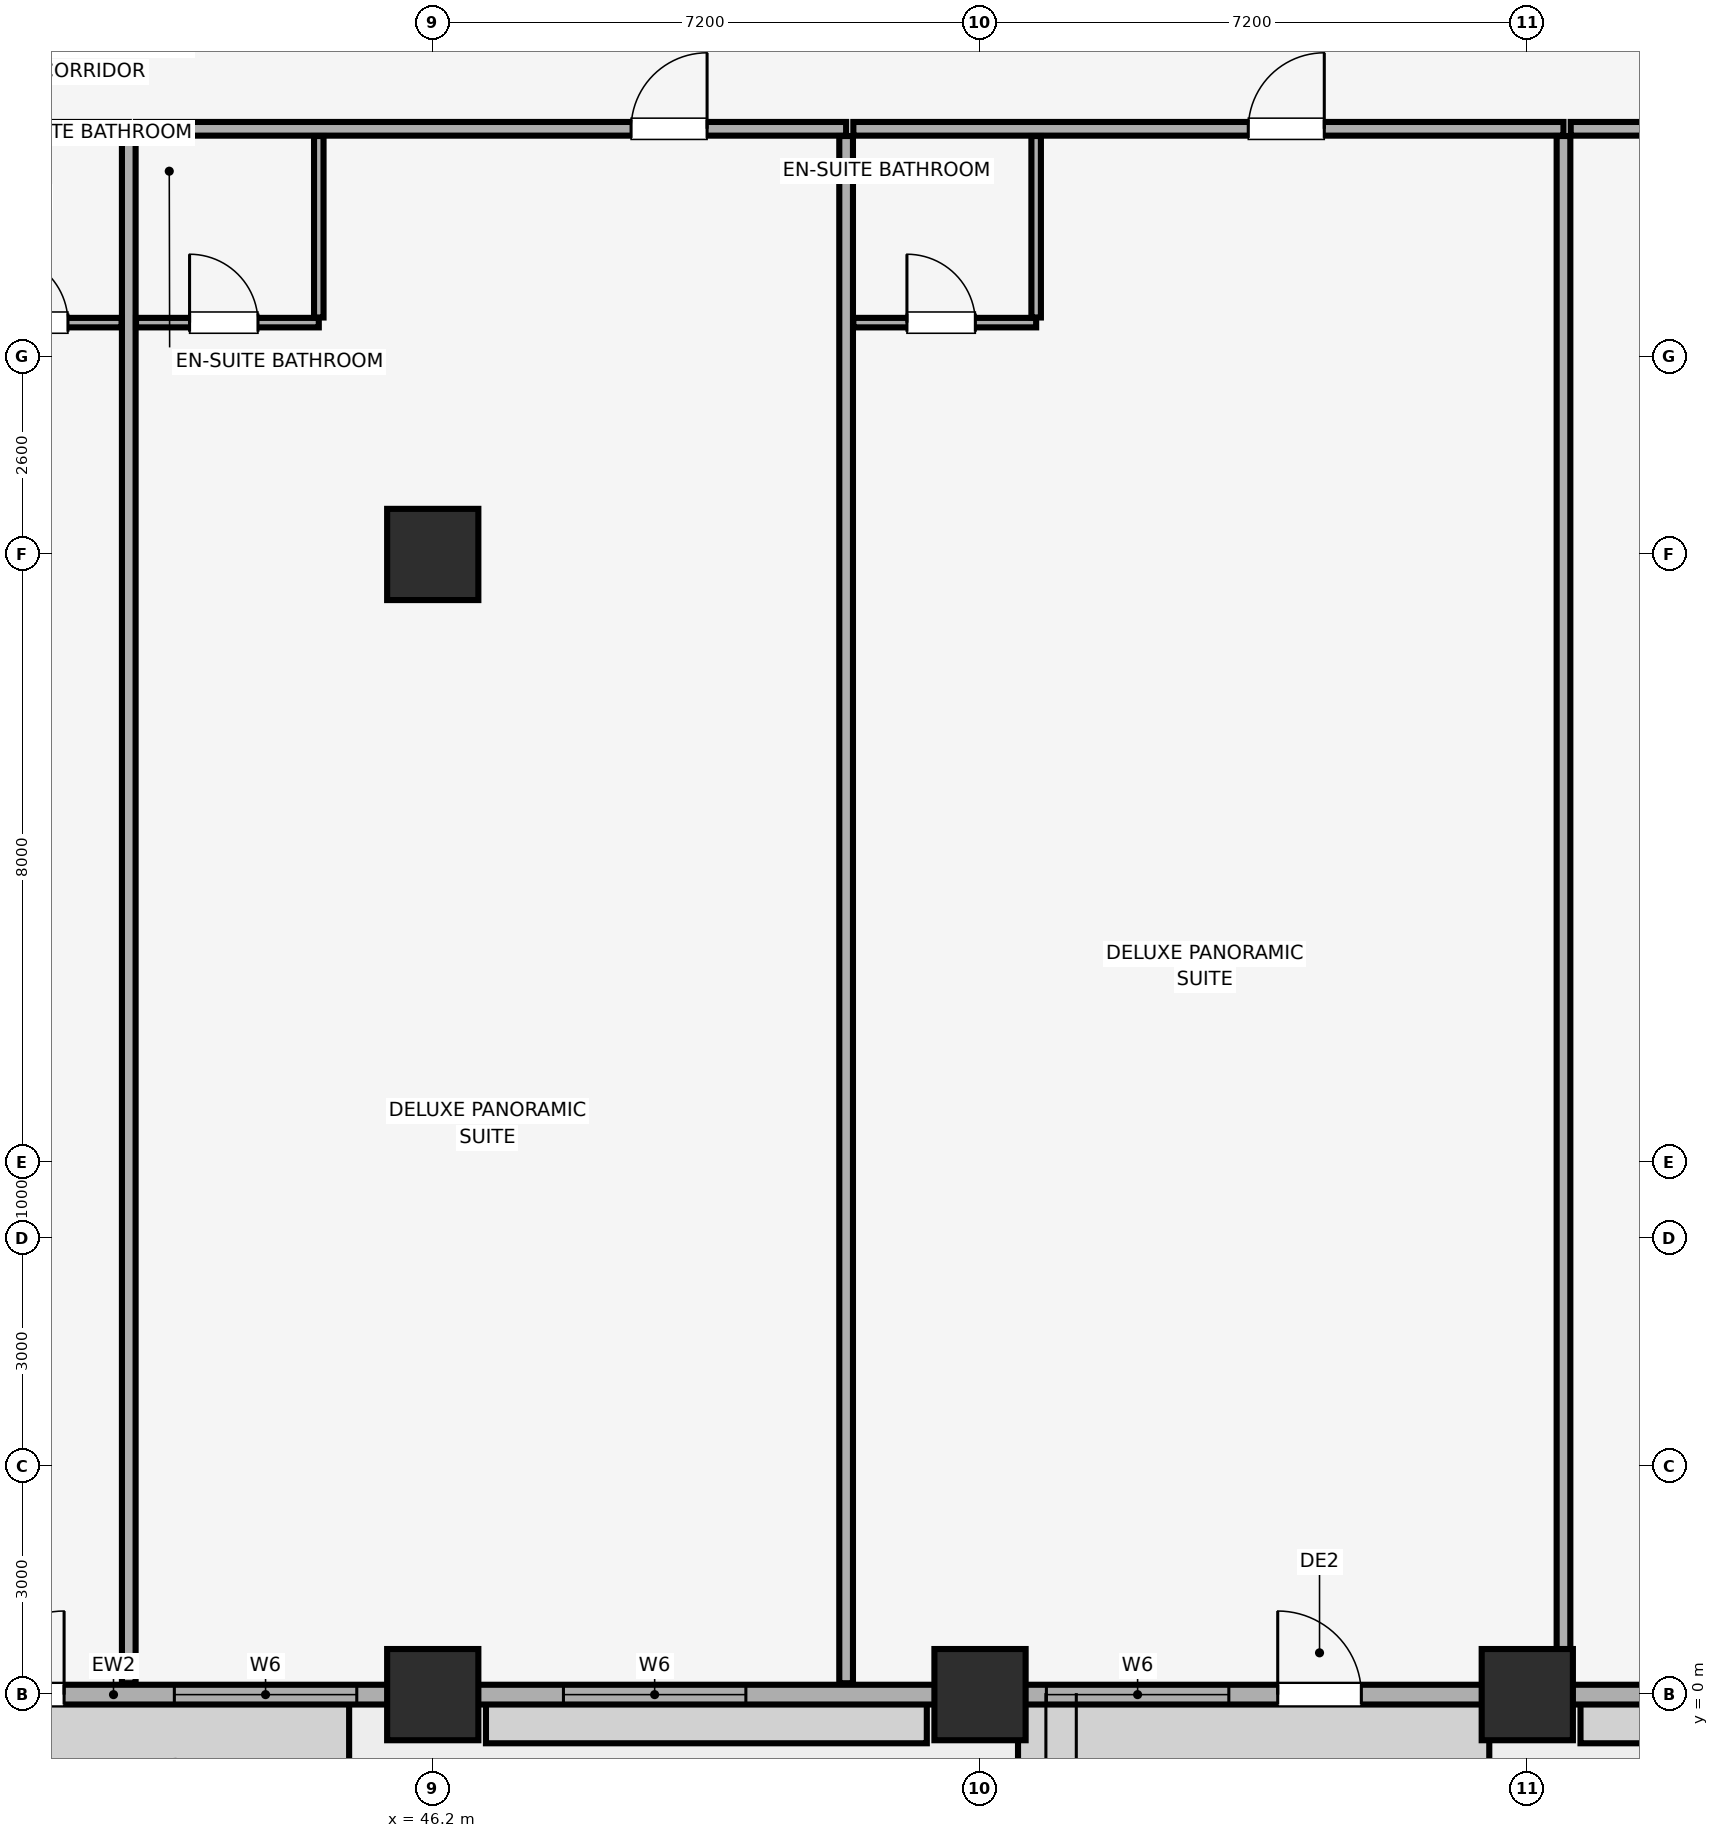
"""IFC4 building model, lengths in metres.
Left out: names, types, materials, properties, quantities, classifications, styles, units other than length and angle.
Written with IfcOpenShell. Run it as: python <this file> out.ifc"""

import sys

from ifc_helpers import new_model, si_unit, direction, frame, frame_2d, origin, origin_2d, place, context, subcontext, project, spatial, rectangle, extrude, element, fill, save


model = new_model("IFC4")
c1 = context("Model", 3, precision=1e-05, world=origin(), true_north=direction((0.0, 1.0)))
c2 = subcontext(c1, "Body", "Model", "MODEL_VIEW")
j1 = project(units=[si_unit("LENGTHUNIT", "METRE"), si_unit("PLANEANGLEUNIT", "RADIAN")], contexts=[c1])
p1 = place(None, origin())
s1 = spatial("IfcSite", under=j1, at=p1, CompositionType="ELEMENT")
p2 = place(p1, origin())
s2 = spatial("IfcBuilding", under=s1, at=p2, CompositionType="ELEMENT")
p3 = place(p2, frame((0.0, 0.0, 93.05)))
s3 = spatial("IfcBuildingStorey", under=s2, at=p3, CompositionType="ELEMENT", Elevation=93.05)
for number, where, z_axis, x_axis in (
    (1, (46.2, 0.0, 0.0), (0.0, 0.0, 1.0), (1.0, 0.0, 0.0)),
    (2, (53.4, 0.0, 0.0), (0.0, 0.0, 1.0), (1.0, 0.0, 0.0)),
    (3, (60.6, 0.0, 0.0), (0.0, 0.0, 1.0), (1.0, 0.0, 0.0)),
    (4, (46.2, 15.0, 0.0), (0.0, 0.0, 1.0), (1.0, 0.0, 0.0)),
):
    element("IfcColumn", number, at=place(p3, frame(where, z_axis=z_axis, x_axis=x_axis)), inside=s3, PredefinedType="COLUMN", context=c2, shape_type="SweptSolid", body=[
        extrude(rectangle(XDim=1.2, YDim=1.2, at=origin_2d()), origin(), (0.0, 0.0, 1.0), 3.51),
    ])
p4 = place(p3, frame((4.2, 0.0, 0.0), z_axis=(0.0, 0.0, 1.0), x_axis=(1.0, 0.0, 0.0)))
e5 = element("IfcWall", 5, at=p4, inside=s3, PredefinedType="SOLIDWALL", context=c2, shape_type="SweptSolid", body=[
    extrude(rectangle(XDim=75.6, YDim=0.26, at=frame_2d((37.8, 0.0))), origin(), (0.0, 0.0, 1.0), 2.56),
])
p5 = place(p4, frame((21.383, 0.0, 0.0)))
e6 = element("IfcOpeningElement", 6, at=p5, cuts=e5, PredefinedType="OPENING", context=c2, shape_type="SweptSolid", body=[
    extrude(rectangle(XDim=1.1, YDim=2.15, at=frame_2d((0.55, 1.075))), frame((0.0, 0.14, 0.0), z_axis=(0.0, -1.0, 0.0), x_axis=(1.0, 0.0, 0.0)), (0.0, 0.0, 1.0), 0.28),
])
p6 = place(p4, frame((36.05, 0.0, 0.0)))
e7 = element("IfcOpeningElement", 7, at=p6, cuts=e5, PredefinedType="OPENING", context=c2, shape_type="SweptSolid", body=[
    extrude(rectangle(XDim=1.1, YDim=2.15, at=frame_2d((0.55, 1.075))), frame((0.0, 0.14, 0.0), z_axis=(0.0, -1.0, 0.0), x_axis=(1.0, 0.0, 0.0)), (0.0, 0.0, 1.0), 0.28),
])
p7 = place(p4, frame((53.117, 0.0, 0.0)))
e8 = element("IfcOpeningElement", 8, at=p7, cuts=e5, PredefinedType="OPENING", context=c2, shape_type="SweptSolid", body=[
    extrude(rectangle(XDim=1.1, YDim=2.15, at=frame_2d((0.55, 1.075))), frame((0.0, 0.14, 0.0), z_axis=(0.0, -1.0, 0.0), x_axis=(1.0, 0.0, 0.0)), (0.0, 0.0, 1.0), 0.28),
])
p8 = place(p4, frame((1.035, 0.0, 0.85)))
e9 = element("IfcOpeningElement", 9, at=p8, cuts=e5, PredefinedType="OPENING", context=c2, shape_type="SweptSolid", body=[
    extrude(rectangle(XDim=2.4, YDim=1.5, at=frame_2d((1.2, 0.75))), frame((0.0, 0.14, 0.0), z_axis=(0.0, -1.0, 0.0), x_axis=(1.0, 0.0, 0.0)), (0.0, 0.0, 1.0), 0.28),
])
p9 = place(p4, frame((6.244, 0.0, 0.85)))
e10 = element("IfcOpeningElement", 10, at=p9, cuts=e5, PredefinedType="OPENING", context=c2, shape_type="SweptSolid", body=[
    extrude(rectangle(XDim=2.4, YDim=1.5, at=frame_2d((1.2, 0.75))), frame((0.0, 0.14, 0.0), z_axis=(0.0, -1.0, 0.0), x_axis=(1.0, 0.0, 0.0)), (0.0, 0.0, 1.0), 0.28),
])
p10 = place(p4, frame((14.4, 0.0, 0.85)))
e11 = element("IfcOpeningElement", 11, at=p10, cuts=e5, PredefinedType="OPENING", context=c2, shape_type="SweptSolid", body=[
    extrude(rectangle(XDim=2.4, YDim=1.5, at=frame_2d((1.2, 0.75))), frame((0.0, 0.14, 0.0), z_axis=(0.0, -1.0, 0.0), x_axis=(1.0, 0.0, 0.0)), (0.0, 0.0, 1.0), 0.28),
])
p11 = place(p4, frame((23.127, 0.0, 0.85)))
e12 = element("IfcOpeningElement", 12, at=p11, cuts=e5, PredefinedType="OPENING", context=c2, shape_type="SweptSolid", body=[
    extrude(rectangle(XDim=2.4, YDim=1.5, at=frame_2d((1.2, 0.75))), frame((0.0, 0.14, 0.0), z_axis=(0.0, -1.0, 0.0), x_axis=(1.0, 0.0, 0.0)), (0.0, 0.0, 1.0), 0.28),
])
p12 = place(p4, frame((29.681, 0.0, 0.85)))
e13 = element("IfcOpeningElement", 13, at=p12, cuts=e5, PredefinedType="OPENING", context=c2, shape_type="SweptSolid", body=[
    extrude(rectangle(XDim=2.4, YDim=1.5, at=frame_2d((1.2, 0.75))), frame((0.0, 0.14, 0.0), z_axis=(0.0, -1.0, 0.0), x_axis=(1.0, 0.0, 0.0)), (0.0, 0.0, 1.0), 0.28),
])
p13 = place(p4, frame((38.601, 0.0, 0.85)))
e14 = element("IfcOpeningElement", 14, at=p13, cuts=e5, PredefinedType="OPENING", context=c2, shape_type="SweptSolid", body=[
    extrude(rectangle(XDim=2.4, YDim=1.5, at=frame_2d((1.2, 0.75))), frame((0.0, 0.14, 0.0), z_axis=(0.0, -1.0, 0.0), x_axis=(1.0, 0.0, 0.0)), (0.0, 0.0, 1.0), 0.28),
])
p14 = place(p4, frame((43.719, 0.0, 0.85)))
e15 = element("IfcOpeningElement", 15, at=p14, cuts=e5, PredefinedType="OPENING", context=c2, shape_type="SweptSolid", body=[
    extrude(rectangle(XDim=2.4, YDim=1.5, at=frame_2d((1.2, 0.75))), frame((0.0, 0.14, 0.0), z_axis=(0.0, -1.0, 0.0), x_axis=(1.0, 0.0, 0.0)), (0.0, 0.0, 1.0), 0.28),
])
p15 = place(p4, frame((50.073, 0.0, 0.85)))
e16 = element("IfcOpeningElement", 16, at=p15, cuts=e5, PredefinedType="OPENING", context=c2, shape_type="SweptSolid", body=[
    extrude(rectangle(XDim=2.4, YDim=1.5, at=frame_2d((1.2, 0.75))), frame((0.0, 0.14, 0.0), z_axis=(0.0, -1.0, 0.0), x_axis=(1.0, 0.0, 0.0)), (0.0, 0.0, 1.0), 0.28),
])
p16 = place(p4, frame((58.838, 0.0, 0.85)))
e17 = element("IfcOpeningElement", 17, at=p16, cuts=e5, PredefinedType="OPENING", context=c2, shape_type="SweptSolid", body=[
    extrude(rectangle(XDim=2.4, YDim=1.5, at=frame_2d((1.2, 0.75))), frame((0.0, 0.14, 0.0), z_axis=(0.0, -1.0, 0.0), x_axis=(1.0, 0.0, 0.0)), (0.0, 0.0, 1.0), 0.28),
])
p17 = place(p4, frame((67.056, 0.0, 0.85)))
e18 = element("IfcOpeningElement", 18, at=p17, cuts=e5, PredefinedType="OPENING", context=c2, shape_type="SweptSolid", body=[
    extrude(rectangle(XDim=2.4, YDim=1.5, at=frame_2d((1.2, 0.75))), frame((0.0, 0.14, 0.0), z_axis=(0.0, -1.0, 0.0), x_axis=(1.0, 0.0, 0.0)), (0.0, 0.0, 1.0), 0.28),
])
p18 = place(p4, frame((72.165, 0.0, 0.85)))
e19 = element("IfcOpeningElement", 19, at=p18, cuts=e5, PredefinedType="OPENING", context=c2, shape_type="SweptSolid", body=[
    extrude(rectangle(XDim=2.4, YDim=1.5, at=frame_2d((1.2, 0.75))), frame((0.0, 0.14, 0.0), z_axis=(0.0, -1.0, 0.0), x_axis=(1.0, 0.0, 0.0)), (0.0, 0.0, 1.0), 0.28),
])
p19 = place(p3, frame((32.858, 20.6, 0.0), z_axis=(0.0, 0.0, 1.0), x_axis=(1.0, 0.0, 0.0)))
e20 = element("IfcWall", 20, at=p19, inside=s3, PredefinedType="PARTITIONING", context=c2, shape_type="SweptSolid", body=[
    extrude(rectangle(XDim=9.343, YDim=0.18, at=frame_2d((4.671, 0.0))), origin(), (0.0, 0.0, 1.0), 3.51),
])
p20 = place(p19, frame((1.533, 0.0, 0.0)))
e21 = element("IfcOpeningElement", 21, at=p20, cuts=e20, PredefinedType="OPENING", context=c2, shape_type="SweptSolid", body=[
    extrude(rectangle(XDim=1.0, YDim=2.15, at=frame_2d((0.5, 1.075))), frame((0.0, 0.1, 0.0), z_axis=(0.0, -1.0, 0.0), x_axis=(1.0, 0.0, 0.0)), (0.0, 0.0, 1.0), 0.2),
])
p21 = place(p3, frame((42.201, 0.15, 0.0), z_axis=(0.0, 0.0, 1.0), x_axis=(0.0, 1.0, 0.0)))
e22 = element("IfcWall", 22, at=p21, inside=s3, PredefinedType="PARTITIONING", context=c2, shape_type="SweptSolid", body=[
    extrude(rectangle(XDim=20.355, YDim=0.18, at=frame_2d((10.177, 0.0))), origin(), (0.0, 0.0, 1.0), 2.898),
])
p22 = place(p3, frame((39.701, 18.05, 0.0), z_axis=(0.0, 0.0, 1.0), x_axis=(1.0, 0.0, 0.0)))
e23 = element("IfcWall", 23, at=p22, inside=s3, PredefinedType="PARTITIONING", context=c2, shape_type="SweptSolid", body=[
    extrude(rectangle(XDim=2.405, YDim=0.125, at=frame_2d((1.203, 0.0))), origin(), (0.0, 0.0, 1.0), 3.51),
])
p23 = place(p22, frame((0.8, 0.0, 0.0)))
e24 = element("IfcOpeningElement", 24, at=p23, cuts=e23, PredefinedType="OPENING", context=c2, shape_type="SweptSolid", body=[
    extrude(rectangle(XDim=0.9, YDim=2.1, at=frame_2d((0.45, 1.05))), frame((0.0, 0.073, 0.0), z_axis=(0.0, -1.0, 0.0), x_axis=(1.0, 0.0, 0.0)), (0.0, 0.0, 1.0), 0.145),
])
p24 = place(p3, frame((42.296, 20.6, 0.0), z_axis=(0.0, 0.0, 1.0), x_axis=(1.0, 0.0, 0.0)))
e25 = element("IfcWall", 25, at=p24, inside=s3, PredefinedType="PARTITIONING", context=c2, shape_type="SweptSolid", body=[
    extrude(rectangle(XDim=9.343, YDim=0.18, at=frame_2d((4.671, 0.0))), origin(), (0.0, 0.0, 1.0), 3.51),
])
p25 = place(p24, frame((6.513, 0.0, 0.0)))
e26 = element("IfcOpeningElement", 26, at=p25, cuts=e25, PredefinedType="OPENING", context=c2, shape_type="SweptSolid", body=[
    extrude(rectangle(XDim=1.0, YDim=2.15, at=frame_2d((0.5, 1.075))), frame((0.0, 0.1, 0.0), z_axis=(0.0, -1.0, 0.0), x_axis=(1.0, 0.0, 0.0)), (0.0, 0.0, 1.0), 0.2),
])
p26 = place(p3, frame((51.638, 0.15, 0.0), z_axis=(0.0, 0.0, 1.0), x_axis=(0.0, 1.0, 0.0)))
e27 = element("IfcWall", 27, at=p26, inside=s3, PredefinedType="PARTITIONING", context=c2, shape_type="SweptSolid", body=[
    extrude(rectangle(XDim=20.355, YDim=0.18, at=frame_2d((10.177, 0.0))), origin(), (0.0, 0.0, 1.0), 3.51),
])
p27 = place(p3, frame((42.296, 18.05, 0.0), z_axis=(0.0, 0.0, 1.0), x_axis=(1.0, 0.0, 0.0)))
e28 = element("IfcWall", 28, at=p27, inside=s3, PredefinedType="PARTITIONING", context=c2, shape_type="SweptSolid", body=[
    extrude(rectangle(XDim=2.405, YDim=0.125, at=frame_2d((1.202, 0.0))), origin(), (0.0, 0.0, 1.0), 3.51),
])
p28 = place(p27, frame((0.705, 0.0, 0.0)))
e29 = element("IfcOpeningElement", 29, at=p28, cuts=e28, PredefinedType="OPENING", context=c2, shape_type="SweptSolid", body=[
    extrude(rectangle(XDim=0.9, YDim=2.1, at=frame_2d((0.45, 1.05))), frame((0.0, 0.073, 0.0), z_axis=(0.0, -1.0, 0.0), x_axis=(1.0, 0.0, 0.0)), (0.0, 0.0, 1.0), 0.145),
])
p29 = place(p3, frame((44.701, 18.117, 0.0), z_axis=(0.0, 0.0, 1.0), x_axis=(0.0, 1.0, 0.0)))
e30 = element("IfcWall", 30, at=p29, inside=s3, PredefinedType="PARTITIONING", context=c2, shape_type="SweptSolid", body=[
    extrude(rectangle(XDim=2.387, YDim=0.125, at=frame_2d((1.194, 0.0))), origin(), (0.0, 0.0, 1.0), 3.51),
])
p30 = place(p3, frame((51.733, 20.6, 0.0), z_axis=(0.0, 0.0, 1.0), x_axis=(1.0, 0.0, 0.0)))
e31 = element("IfcWall", 31, at=p30, inside=s3, PredefinedType="PARTITIONING", context=c2, shape_type="SweptSolid", body=[
    extrude(rectangle(XDim=9.343, YDim=0.18, at=frame_2d((4.671, 0.0))), origin(), (0.0, 0.0, 1.0), 3.51),
])
p31 = place(p30, frame((5.196, 0.0, 0.0)))
e32 = element("IfcOpeningElement", 32, at=p31, cuts=e31, PredefinedType="OPENING", context=c2, shape_type="SweptSolid", body=[
    extrude(rectangle(XDim=1.0, YDim=2.15, at=frame_2d((0.5, 1.075))), frame((0.0, 0.1, 0.0), z_axis=(0.0, -1.0, 0.0), x_axis=(1.0, 0.0, 0.0)), (0.0, 0.0, 1.0), 0.2),
])
p32 = place(p3, frame((61.076, 0.15, 0.0), z_axis=(0.0, 0.0, 1.0), x_axis=(0.0, 1.0, 0.0)))
e33 = element("IfcWall", 33, at=p32, inside=s3, PredefinedType="PARTITIONING", context=c2, shape_type="SweptSolid", body=[
    extrude(rectangle(XDim=20.355, YDim=0.18, at=frame_2d((10.177, 0.0))), origin(), (0.0, 0.0, 1.0), 3.51),
])
p33 = place(p3, frame((51.733, 18.05, 0.0), z_axis=(0.0, 0.0, 1.0), x_axis=(1.0, 0.0, 0.0)))
e34 = element("IfcWall", 34, at=p33, inside=s3, PredefinedType="PARTITIONING", context=c2, shape_type="SweptSolid", body=[
    extrude(rectangle(XDim=2.405, YDim=0.125, at=frame_2d((1.203, 0.0))), origin(), (0.0, 0.0, 1.0), 3.51),
])
p34 = place(p33, frame((0.705, 0.0, 0.0)))
e35 = element("IfcOpeningElement", 35, at=p34, cuts=e34, PredefinedType="OPENING", context=c2, shape_type="SweptSolid", body=[
    extrude(rectangle(XDim=0.9, YDim=2.1, at=frame_2d((0.45, 1.05))), frame((0.0, 0.073, 0.0), z_axis=(0.0, -1.0, 0.0), x_axis=(1.0, 0.0, 0.0)), (0.0, 0.0, 1.0), 0.145),
])
p35 = place(p3, frame((54.138, 18.117, 0.0), z_axis=(0.0, 0.0, 1.0), x_axis=(0.0, 1.0, 0.0)))
e36 = element("IfcWall", 36, at=p35, inside=s3, PredefinedType="PARTITIONING", context=c2, shape_type="SweptSolid", body=[
    extrude(rectangle(XDim=2.387, YDim=0.125, at=frame_2d((1.194, 0.0))), origin(), (0.0, 0.0, 1.0), 3.51),
])
p36 = place(p3, frame((61.171, 20.6, 0.0), z_axis=(0.0, 0.0, 1.0), x_axis=(1.0, 0.0, 0.0)))
e37 = element("IfcWall", 37, at=p36, inside=s3, PredefinedType="PARTITIONING", context=c2, shape_type="SweptSolid", body=[
    extrude(rectangle(XDim=9.142, YDim=0.18, at=frame_2d((4.571, 0.0))), origin(), (0.0, 0.0, 1.0), 3.51),
])
p37 = place(p36, frame((2.475, 0.0, 0.0)))
e38 = element("IfcOpeningElement", 38, at=p37, cuts=e37, PredefinedType="OPENING", context=c2, shape_type="SweptSolid", body=[
    extrude(rectangle(XDim=1.0, YDim=2.15, at=frame_2d((0.5, 1.075))), frame((0.0, 0.1, 0.0), z_axis=(0.0, -1.0, 0.0), x_axis=(1.0, 0.0, 0.0)), (0.0, 0.0, 1.0), 0.2),
])
p38 = place(p6, origin())
e39 = element("IfcDoor", 39, at=p38, inside=s3, OperationType="SINGLE_SWING_RIGHT", PredefinedType="DOOR", context=c2, shape_type="SweptSolid", body=[
    extrude(rectangle(XDim=1.1, YDim=2.15, at=frame_2d((0.55, 1.075))), frame((0.0, 0.025, 0.0), z_axis=(0.0, -1.0, 0.0), x_axis=(1.0, 0.0, 0.0)), (0.0, 0.0, 1.0), 0.05),
])
fill(e7, e39)
p39 = place(p7, origin())
e40 = element("IfcDoor", 40, at=p39, inside=s3, OperationType="SINGLE_SWING_LEFT", PredefinedType="DOOR", context=c2, shape_type="SweptSolid", body=[
    extrude(rectangle(XDim=1.1, YDim=2.15, at=frame_2d((0.55, 1.075))), frame((0.0, 0.025, 0.0), z_axis=(0.0, -1.0, 0.0), x_axis=(1.0, 0.0, 0.0)), (0.0, 0.0, 1.0), 0.05),
])
fill(e8, e40)
p40 = place(p13, origin())
e41 = element("IfcWindow", 41, at=p40, inside=s3, PartitioningType="SINGLE_PANEL", PredefinedType="WINDOW", context=c2, shape_type="SweptSolid", body=[
    extrude(rectangle(XDim=2.4, YDim=1.5, at=frame_2d((1.2, 0.75))), frame((0.0, 0.03, 0.0), z_axis=(0.0, -1.0, 0.0), x_axis=(1.0, 0.0, 0.0)), (0.0, 0.0, 1.0), 0.06),
])
fill(e14, e41)
p41 = place(p14, origin())
e42 = element("IfcWindow", 42, at=p41, inside=s3, PartitioningType="SINGLE_PANEL", PredefinedType="WINDOW", context=c2, shape_type="SweptSolid", body=[
    extrude(rectangle(XDim=2.4, YDim=1.5, at=frame_2d((1.2, 0.75))), frame((0.0, 0.03, 0.0), z_axis=(0.0, -1.0, 0.0), x_axis=(1.0, 0.0, 0.0)), (0.0, 0.0, 1.0), 0.06),
])
fill(e15, e42)
p42 = place(p15, origin())
e43 = element("IfcWindow", 43, at=p42, inside=s3, PartitioningType="SINGLE_PANEL", PredefinedType="WINDOW", context=c2, shape_type="SweptSolid", body=[
    extrude(rectangle(XDim=2.4, YDim=1.5, at=frame_2d((1.2, 0.75))), frame((0.0, 0.03, 0.0), z_axis=(0.0, -1.0, 0.0), x_axis=(1.0, 0.0, 0.0)), (0.0, 0.0, 1.0), 0.06),
])
fill(e16, e43)
p43 = place(p23, origin())
e44 = element("IfcDoor", 44, at=p43, inside=s3, OperationType="SINGLE_SWING_LEFT", PredefinedType="DOOR", context=c2, shape_type="SweptSolid", body=[
    extrude(rectangle(XDim=0.9, YDim=2.1, at=frame_2d((0.45, 1.05))), frame((0.0, 0.025, 0.0), z_axis=(0.0, -1.0, 0.0), x_axis=(1.0, 0.0, 0.0)), (0.0, 0.0, 1.0), 0.05),
])
fill(e24, e44)
p44 = place(p25, origin())
e45 = element("IfcDoor", 45, at=p44, inside=s3, OperationType="SINGLE_SWING_RIGHT", PredefinedType="DOOR", context=c2, shape_type="SweptSolid", body=[
    extrude(rectangle(XDim=1.0, YDim=2.15, at=frame_2d((0.5, 1.075))), frame((0.0, 0.025, 0.0), z_axis=(0.0, -1.0, 0.0), x_axis=(1.0, 0.0, 0.0)), (0.0, 0.0, 1.0), 0.05),
])
fill(e26, e45)
p45 = place(p28, origin())
e46 = element("IfcDoor", 46, at=p45, inside=s3, OperationType="SINGLE_SWING_LEFT", PredefinedType="DOOR", context=c2, shape_type="SweptSolid", body=[
    extrude(rectangle(XDim=0.9, YDim=2.1, at=frame_2d((0.45, 1.05))), frame((0.0, 0.025, 0.0), z_axis=(0.0, -1.0, 0.0), x_axis=(1.0, 0.0, 0.0)), (0.0, 0.0, 1.0), 0.05),
])
fill(e29, e46)
p46 = place(p31, origin())
e47 = element("IfcDoor", 47, at=p46, inside=s3, OperationType="SINGLE_SWING_RIGHT", PredefinedType="DOOR", context=c2, shape_type="SweptSolid", body=[
    extrude(rectangle(XDim=1.0, YDim=2.15, at=frame_2d((0.5, 1.075))), frame((0.0, 0.025, 0.0), z_axis=(0.0, -1.0, 0.0), x_axis=(1.0, 0.0, 0.0)), (0.0, 0.0, 1.0), 0.05),
])
fill(e32, e47)
p47 = place(p34, origin())
e48 = element("IfcDoor", 48, at=p47, inside=s3, OperationType="SINGLE_SWING_LEFT", PredefinedType="DOOR", context=c2, shape_type="SweptSolid", body=[
    extrude(rectangle(XDim=0.9, YDim=2.1, at=frame_2d((0.45, 1.05))), frame((0.0, 0.025, 0.0), z_axis=(0.0, -1.0, 0.0), x_axis=(1.0, 0.0, 0.0)), (0.0, 0.0, 1.0), 0.05),
])
fill(e35, e48)
save(model, sys.argv[1])
